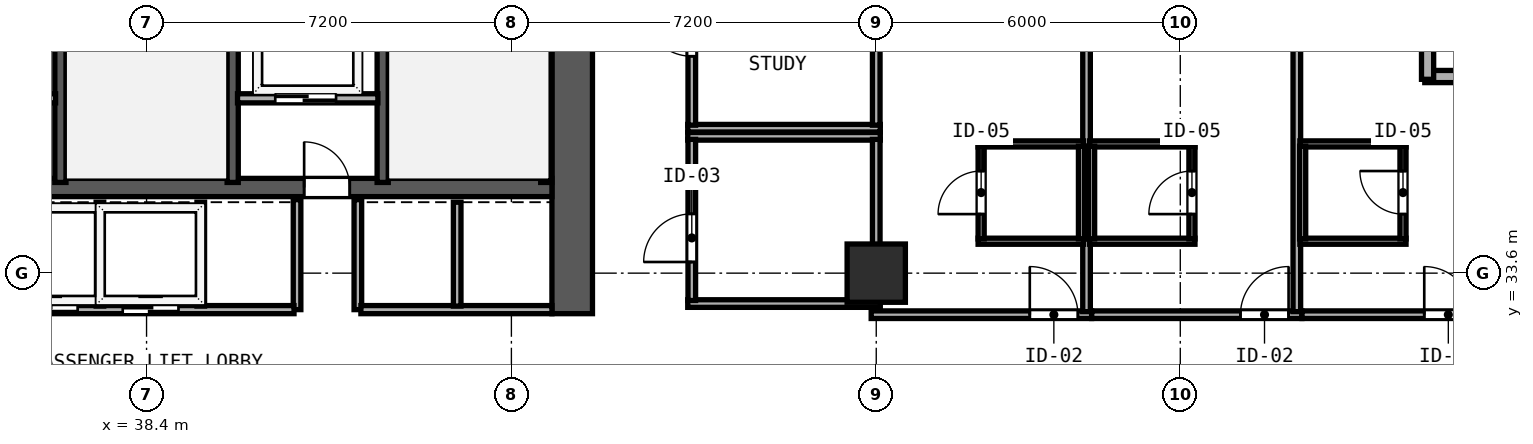
"""IFC4 building model, lengths in metres.
Left out: names, types, materials, properties, quantities, classifications, styles, units other than length and angle.
Written with IfcOpenShell. Run it as: python <this file> out.ifc"""

import sys

from ifc_helpers import new_model, si_unit, direction, frame, frame_2d, origin, origin_2d, place, context, subcontext, project, spatial, rectangle, hollow_rectangle, extrude, element, fill, save


model = new_model("IFC4")
c1 = context("Model", 3, precision=1e-05, world=origin(), true_north=direction((0.0, 1.0)))
c2 = subcontext(c1, "Body", "Model", "MODEL_VIEW")
j1 = project(units=[si_unit("LENGTHUNIT", "METRE"), si_unit("PLANEANGLEUNIT", "RADIAN")], contexts=[c1])
p1 = place(None, origin())
s1 = spatial("IfcSite", under=j1, at=p1, CompositionType="ELEMENT")
p2 = place(p1, origin())
s2 = spatial("IfcBuilding", under=s1, at=p2, CompositionType="ELEMENT")
p3 = place(p2, frame((0.0, 0.0, 85.6)))
s3 = spatial("IfcBuildingStorey", under=s2, at=p3, CompositionType="ELEMENT", Elevation=85.6)
p4 = place(p3, frame((46.8, 32.8, 0.0), z_axis=(0.0, 0.0, 1.0), x_axis=(0.0, 1.0, 0.0)))
e1 = element("IfcWall", 1, at=p4, inside=s3, PredefinedType="SHEAR", context=c2, shape_type="SweptSolid", body=[
    extrude(rectangle(XDim=10.0, YDim=0.8, at=frame_2d((5.0, 0.0))), origin(), (0.0, 0.0, 1.0), 3.54),
])
p5 = place(p3, frame((30.4, 35.29, 0.0), z_axis=(0.0, 0.0, 1.0), x_axis=(1.0, 0.0, 0.0)))
e2 = element("IfcWall", 2, at=p5, inside=s3, PredefinedType="SHEAR", context=c2, shape_type="SweptSolid", body=[
    extrude(rectangle(XDim=16.0, YDim=0.36, at=frame_2d((8.0, 0.0))), origin(), (0.0, 0.0, 1.0), 3.54),
])
p6 = place(p5, frame((4.95, 0.0, 0.0), z_axis=(0.0, 0.0, 1.0), x_axis=(-1.0, 0.0, 0.0)))
e3 = element("IfcOpeningElement", 3, at=p6, cuts=e2, PredefinedType="OPENING", context=c2, shape_type="SweptSolid", body=[
    extrude(rectangle(XDim=0.9, YDim=2.1, at=frame_2d((0.45, 1.05))), frame((0.0, 0.19, 0.0), z_axis=(0.0, -1.0, 0.0), x_axis=(1.0, 0.0, 0.0)), (0.0, 0.0, 1.0), 0.38),
])
p7 = place(p5, frame((12.01, 0.0, 0.0), z_axis=(0.0, 0.0, 1.0), x_axis=(-1.0, 0.0, 0.0)))
e4 = element("IfcOpeningElement", 4, at=p7, cuts=e2, PredefinedType="OPENING", context=c2, shape_type="SweptSolid", body=[
    extrude(rectangle(XDim=0.9, YDim=2.1, at=frame_2d((0.45, 1.05))), frame((0.0, 0.19, 0.0), z_axis=(0.0, -1.0, 0.0), x_axis=(1.0, 0.0, 0.0)), (0.0, 0.0, 1.0), 0.38),
])
for number, where, z_axis, x_axis in (
    (5, (36.7, 35.39, 0.0), (0.0, 0.0, 1.0), (0.0, 1.0, 0.0)),
    (6, (40.1, 35.39, 0.0), (0.0, 0.0, 1.0), (0.0, 1.0, 0.0)),
    (7, (43.06, 35.39, 0.0), (0.0, 0.0, 1.0), (0.0, 1.0, 0.0)),
    (8, (46.288, 35.39, 0.0), (0.0, 0.0, 1.0), (0.0, 1.0, 0.0)),
):
    element("IfcWall", number, at=place(p3, frame(where, z_axis=z_axis, x_axis=x_axis)), inside=s3, PredefinedType="SHEAR", context=c2, shape_type="SweptSolid", body=[
        extrude(rectangle(XDim=7.41, YDim=0.22, at=frame_2d((3.705, 0.0))), origin(), (0.0, 0.0, 1.0), 3.54),
    ])
p8 = place(p3, frame((52.8, 33.6, 0.0), z_axis=(0.0, 0.0, 1.0), x_axis=(1.0, 0.0, 0.0)))
e9 = element("IfcColumn", 9, at=p8, inside=s3, PredefinedType="COLUMN", context=c2, shape_type="SweptSolid", body=[
    extrude(hollow_rectangle(XDim=1.15, YDim=1.15, WallThickness=0.042, at=origin_2d()), origin(), (0.0, 0.0, 1.0), 3.8),
])
p9 = place(p3, frame((64.735, 37.48, 0.0), z_axis=(0.0, 0.0, 1.0), x_axis=(-1.0, 0.0, 0.0)))
e10 = element("IfcWall", 10, at=p9, inside=s3, PredefinedType="SOLIDWALL", context=c2, shape_type="SweptSolid", body=[
    extrude(rectangle(XDim=1.11, YDim=0.24, at=frame_2d((0.555, 0.0))), origin(), (0.0, 0.0, 1.0), 3.54),
])
p10 = place(p3, frame((63.68, 37.425, 0.0), z_axis=(0.0, 0.0, 1.0), x_axis=(0.0, 1.0, 0.0)))
e11 = element("IfcWall", 11, at=p10, inside=s3, PredefinedType="SOLIDWALL", context=c2, shape_type="SweptSolid", body=[
    extrude(rectangle(XDim=1.11, YDim=0.24, at=frame_2d((0.555, 0.0))), origin(), (0.0, 0.0, 1.0), 3.54),
])
p11 = place(p3, frame((33.835, 37.05, 0.0), z_axis=(0.0, 0.0, 1.0), x_axis=(1.0, 0.0, 0.0)))
e12 = element("IfcWall", 12, at=p11, inside=s3, PredefinedType="SOLIDWALL", context=c2, shape_type="SweptSolid", body=[
    extrude(rectangle(XDim=2.77, YDim=0.18, at=frame_2d((1.385, 0.0))), origin(), (0.0, 0.0, 1.0), 3.54),
])
p12 = place(p11, frame((1.945, 0.0, 0.0), z_axis=(0.0, 0.0, 1.0), x_axis=(-1.0, 0.0, 0.0)))
e13 = element("IfcOpeningElement", 13, at=p12, cuts=e12, PredefinedType="OPENING", context=c2, shape_type="SweptSolid", body=[
    extrude(rectangle(XDim=1.2, YDim=2.2, at=frame_2d((0.6, 1.1))), frame((0.0, 0.1, 0.0), z_axis=(0.0, -1.0, 0.0), x_axis=(1.0, 0.0, 0.0)), (0.0, 0.0, 1.0), 0.2),
])
p13 = place(p3, frame((40.195, 37.05, 0.0), z_axis=(0.0, 0.0, 1.0), x_axis=(1.0, 0.0, 0.0)))
e14 = element("IfcWall", 14, at=p13, inside=s3, PredefinedType="SOLIDWALL", context=c2, shape_type="SweptSolid", body=[
    extrude(rectangle(XDim=2.77, YDim=0.18, at=frame_2d((1.385, 0.0))), origin(), (0.0, 0.0, 1.0), 3.54),
])
p14 = place(p13, frame((1.945, 0.0, 0.0), z_axis=(0.0, 0.0, 1.0), x_axis=(-1.0, 0.0, 0.0)))
e15 = element("IfcOpeningElement", 15, at=p14, cuts=e14, PredefinedType="OPENING", context=c2, shape_type="SweptSolid", body=[
    extrude(rectangle(XDim=1.2, YDim=2.2, at=frame_2d((0.6, 1.1))), frame((0.0, 0.1, 0.0), z_axis=(0.0, -1.0, 0.0), x_axis=(1.0, 0.0, 0.0)), (0.0, 0.0, 1.0), 0.2),
])
for number, where, z_axis, x_axis in (
    (16, (41.37, 32.88, 0.0), (0.0, 0.0, 1.0), (0.0, 1.0, 0.0)),
    (17, (42.57, 32.88, 0.0), (0.0, 0.0, 1.0), (0.0, 1.0, 0.0)),
):
    element("IfcWall", number, at=place(p3, frame(where, z_axis=z_axis, x_axis=x_axis)), inside=s3, PredefinedType="SOLIDWALL", context=c2, shape_type="SweptSolid", body=[
        extrude(rectangle(XDim=2.17, YDim=0.15, at=frame_2d((1.085, 0.0))), origin(), (0.0, 0.0, 1.0), 3.54),
    ])
p15 = place(p3, frame((35.57, 32.88, 0.0), z_axis=(0.0, 0.0, 1.0), x_axis=(1.0, 0.0, 0.0)))
e18 = element("IfcWall", 18, at=p15, inside=s3, PredefinedType="SOLIDWALL", context=c2, shape_type="SweptSolid", body=[
    extrude(rectangle(XDim=5.74, YDim=0.16, at=frame_2d((2.87, 0.0))), origin(), (0.0, 0.0, 1.0), 3.54),
])
p16 = place(p15, frame((1.47, 0.0, 0.0), z_axis=(0.0, 0.0, 1.0), x_axis=(-1.0, 0.0, 0.0)))
e19 = element("IfcOpeningElement", 19, at=p16, cuts=e18, PredefinedType="OPENING", context=c2, shape_type="SweptSolid", body=[
    extrude(rectangle(XDim=1.1, YDim=2.2, at=frame_2d((0.55, 1.1))), frame((0.0, 0.09, 0.0), z_axis=(0.0, -1.0, 0.0), x_axis=(1.0, 0.0, 0.0)), (0.0, 0.0, 1.0), 0.18),
])
p17 = place(p15, frame((3.46, 0.0, 0.0), z_axis=(0.0, 0.0, 1.0), x_axis=(-1.0, 0.0, 0.0)))
e20 = element("IfcOpeningElement", 20, at=p17, cuts=e18, PredefinedType="OPENING", context=c2, shape_type="SweptSolid", body=[
    extrude(rectangle(XDim=1.1, YDim=2.2, at=frame_2d((0.55, 1.1))), frame((0.0, 0.09, 0.0), z_axis=(0.0, -1.0, 0.0), x_axis=(1.0, 0.0, 0.0)), (0.0, 0.0, 1.0), 0.18),
])
p18 = place(p3, frame((42.63, 32.88, 0.0), z_axis=(0.0, 0.0, 1.0), x_axis=(1.0, 0.0, 0.0)))
e21 = element("IfcWall", 21, at=p18, inside=s3, PredefinedType="SOLIDWALL", context=c2, shape_type="SweptSolid", body=[
    extrude(rectangle(XDim=3.77, YDim=0.16, at=frame_2d((1.885, 0.0))), origin(), (0.0, 0.0, 1.0), 3.54),
])
for number, where, z_axis, x_axis in (
    (22, (37.48, 32.95, 0.0), (0.0, 0.0, 1.0), (0.0, 1.0, 0.0)),
    (23, (39.47, 32.95, 0.0), (0.0, 0.0, 1.0), (0.0, 1.0, 0.0)),
    (24, (44.53, 32.95, 0.0), (0.0, 0.0, 1.0), (0.0, 1.0, 0.0)),
):
    element("IfcWall", number, at=place(p3, frame(where, z_axis=z_axis, x_axis=x_axis)), inside=s3, PredefinedType="SOLIDWALL", context=c2, shape_type="SweptSolid", body=[
        extrude(rectangle(XDim=2.05, YDim=0.15, at=frame_2d((1.025, 0.0))), origin(), (0.0, 0.0, 1.0), 3.54),
    ])
for number, where, z_axis, x_axis in (
    (25, (49.08, 36.3, 0.0), (0.0, 0.0, 1.0), (1.0, 0.0, 0.0)),
    (26, (49.08, 33.0, 0.0), (0.0, 0.0, 1.0), (1.0, 0.0, 0.0)),
):
    element("IfcWall", number, at=place(p3, frame(where, z_axis=z_axis, x_axis=x_axis)), inside=s3, PredefinedType="PARTITIONING", context=c2, shape_type="SweptSolid", body=[
        extrude(rectangle(XDim=3.8, YDim=0.15, at=frame_2d((1.9, 0.0))), origin(), (0.0, 0.0, 1.0), 3.54),
    ])
p19 = place(p3, frame((49.16, 33.06, 0.0), z_axis=(0.0, 0.0, 1.0), x_axis=(0.0, 1.0, 0.0)))
e27 = element("IfcWall", 27, at=p19, inside=s3, PredefinedType="PARTITIONING", context=c2, shape_type="SweptSolid", body=[
    extrude(rectangle(XDim=3.18, YDim=0.15, at=frame_2d((1.59, 0.0))), origin(), (0.0, 0.0, 1.0), 3.54),
])
p20 = place(p19, frame((0.76, 0.0, 0.0)))
e28 = element("IfcOpeningElement", 28, at=p20, cuts=e27, PredefinedType="OPENING", context=c2, shape_type="SweptSolid", body=[
    extrude(rectangle(XDim=0.95, YDim=2.12, at=frame_2d((0.475, 1.06))), frame((0.0, 0.085, 0.0), z_axis=(0.0, -1.0, 0.0), x_axis=(1.0, 0.0, 0.0)), (0.0, 0.0, 1.0), 0.17),
])
p21 = place(p3, frame((52.8, 33.06, 0.0), z_axis=(0.0, 0.0, 1.0), x_axis=(0.0, 1.0, 0.0)))
e29 = element("IfcWall", 29, at=p21, inside=s3, PredefinedType="PARTITIONING", context=c2, shape_type="SweptSolid", body=[
    extrude(rectangle(XDim=3.18, YDim=0.15, at=frame_2d((1.59, 0.0))), origin(), (0.0, 0.0, 1.0), 3.037),
])
p22 = place(p3, frame((49.08, 36.46, 0.0), z_axis=(0.0, 0.0, 1.0), x_axis=(1.0, 0.0, 0.0)))
e30 = element("IfcWall", 30, at=p22, inside=s3, PredefinedType="PARTITIONING", context=c2, shape_type="SweptSolid", body=[
    extrude(rectangle(XDim=3.8, YDim=0.15, at=frame_2d((1.9, 0.0))), origin(), (0.0, 0.0, 1.0), 3.54),
])
p23 = place(p3, frame((49.16, 36.52, 0.0), z_axis=(0.0, 0.0, 1.0), x_axis=(0.0, 1.0, 0.0)))
e31 = element("IfcWall", 31, at=p23, inside=s3, PredefinedType="PARTITIONING", context=c2, shape_type="SweptSolid", body=[
    extrude(rectangle(XDim=4.62, YDim=0.15, at=frame_2d((2.31, 0.0))), origin(), (0.0, 0.0, 1.0), 3.54),
])
p24 = place(p23, frame((1.36, 0.0, 0.0)))
e32 = element("IfcOpeningElement", 32, at=p24, cuts=e31, PredefinedType="OPENING", context=c2, shape_type="SweptSolid", body=[
    extrude(rectangle(XDim=0.95, YDim=2.12, at=frame_2d((0.475, 1.06))), frame((0.0, 0.085, 0.0), z_axis=(0.0, -1.0, 0.0), x_axis=(1.0, 0.0, 0.0)), (0.0, 0.0, 1.0), 0.17),
])
p25 = place(p3, frame((52.8, 36.52, 0.0), z_axis=(0.0, 0.0, 1.0), x_axis=(0.0, 1.0, 0.0)))
e33 = element("IfcWall", 33, at=p25, inside=s3, PredefinedType="PARTITIONING", context=c2, shape_type="SweptSolid", body=[
    extrude(rectangle(XDim=4.62, YDim=0.15, at=frame_2d((2.31, 0.0))), origin(), (0.0, 0.0, 1.0), 3.037),
])
p26 = place(p3, frame((52.7, 32.78, 0.0), z_axis=(0.0, 0.0, 1.0), x_axis=(1.0, 0.0, 0.0)))
e34 = element("IfcWall", 34, at=p26, inside=s3, PredefinedType="PARTITIONING", context=c2, shape_type="SweptSolid", body=[
    extrude(rectangle(XDim=4.35, YDim=0.15, at=frame_2d((2.175, 0.0))), origin(), (0.0, 0.0, 1.0), 3.54),
])
p27 = place(p26, frame((3.13, 0.0, 0.0)))
e35 = element("IfcOpeningElement", 35, at=p27, cuts=e34, PredefinedType="OPENING", context=c2, shape_type="SweptSolid", body=[
    extrude(rectangle(XDim=0.95, YDim=2.15, at=frame_2d((0.475, 1.075))), frame((0.0, 0.085, 0.0), z_axis=(0.0, -1.0, 0.0), x_axis=(1.0, 0.0, 0.0)), (0.0, 0.0, 1.0), 0.17),
])
p28 = place(p3, frame((56.95, 32.84, 0.0), z_axis=(0.0, 0.0, 1.0), x_axis=(0.0, 1.0, 0.0)))
e36 = element("IfcWall", 36, at=p28, inside=s3, PredefinedType="PARTITIONING", context=c2, shape_type="SweptSolid", body=[
    extrude(rectangle(XDim=9.939, YDim=0.15, at=frame_2d((4.97, 0.0))), origin(), (0.0, 0.0, 1.0), 3.54),
])
for number, where, z_axis, x_axis in (
    (37, (54.81, 36.15, 0.0), (0.0, 0.0, 1.0), (1.0, 0.0, 0.0)),
    (38, (54.81, 34.23, 0.0), (0.0, 0.0, 1.0), (1.0, 0.0, 0.0)),
):
    element("IfcWall", number, at=place(p3, frame(where, z_axis=z_axis, x_axis=x_axis)), inside=s3, PredefinedType="PARTITIONING", context=c2, shape_type="SweptSolid", body=[
        extrude(rectangle(XDim=2.08, YDim=0.12, at=frame_2d((1.04, 0.0))), origin(), (0.0, 0.0, 1.0), 3.54),
    ])
p29 = place(p3, frame((54.87, 34.275, 0.0), z_axis=(0.0, 0.0, 1.0), x_axis=(0.0, 1.0, 0.0)))
e39 = element("IfcWall", 39, at=p29, inside=s3, PredefinedType="PARTITIONING", context=c2, shape_type="SweptSolid", body=[
    extrude(rectangle(XDim=1.83, YDim=0.12, at=frame_2d((0.915, 0.0))), origin(), (0.0, 0.0, 1.0), 3.54),
])
p30 = place(p29, frame((1.34, 0.0, 0.0), z_axis=(0.0, 0.0, 1.0), x_axis=(-1.0, 0.0, 0.0)))
e40 = element("IfcOpeningElement", 40, at=p30, cuts=e39, PredefinedType="OPENING", context=c2, shape_type="SweptSolid", body=[
    extrude(rectangle(XDim=0.85, YDim=2.1, at=frame_2d((0.425, 1.05))), frame((0.0, 0.07, 0.0), z_axis=(0.0, -1.0, 0.0), x_axis=(1.0, 0.0, 0.0)), (0.0, 0.0, 1.0), 0.14),
])
p31 = place(p3, frame((56.85, 34.275, 0.0), z_axis=(0.0, 0.0, 1.0), x_axis=(0.0, 1.0, 0.0)))
e41 = element("IfcWall", 41, at=p31, inside=s3, PredefinedType="PARTITIONING", context=c2, shape_type="SweptSolid", body=[
    extrude(rectangle(XDim=1.83, YDim=0.12, at=frame_2d((0.915, 0.0))), origin(), (0.0, 0.0, 1.0), 3.54),
])
p32 = place(p3, frame((57.052, 32.78, 0.0), z_axis=(0.0, 0.0, 1.0), x_axis=(1.0, 0.0, 0.0)))
e42 = element("IfcWall", 42, at=p32, inside=s3, PredefinedType="PARTITIONING", context=c2, shape_type="SweptSolid", body=[
    extrude(rectangle(XDim=4.148, YDim=0.15, at=frame_2d((2.074, 0.0))), origin(), (0.0, 0.0, 1.0), 3.54),
])
p33 = place(p32, frame((2.935, 0.0, 0.0)))
e43 = element("IfcOpeningElement", 43, at=p33, cuts=e42, PredefinedType="OPENING", context=c2, shape_type="SweptSolid", body=[
    extrude(rectangle(XDim=0.95, YDim=2.15, at=frame_2d((0.475, 1.075))), frame((0.0, 0.085, 0.0), z_axis=(0.0, -1.0, 0.0), x_axis=(1.0, 0.0, 0.0)), (0.0, 0.0, 1.0), 0.17),
])
p34 = place(p3, frame((61.1, 32.84, 0.0), z_axis=(0.0, 0.0, 1.0), x_axis=(0.0, 1.0, 0.0)))
e44 = element("IfcWall", 44, at=p34, inside=s3, PredefinedType="PARTITIONING", context=c2, shape_type="SweptSolid", body=[
    extrude(rectangle(XDim=7.921, YDim=0.15, at=frame_2d((3.96, 0.0))), origin(), (0.0, 0.0, 1.0), 3.54),
])
for number, where, z_axis, x_axis in (
    (45, (57.01, 36.15, 0.0), (0.0, 0.0, 1.0), (1.0, 0.0, 0.0)),
    (46, (57.01, 34.23, 0.0), (0.0, 0.0, 1.0), (1.0, 0.0, 0.0)),
):
    element("IfcWall", number, at=place(p3, frame(where, z_axis=z_axis, x_axis=x_axis)), inside=s3, PredefinedType="PARTITIONING", context=c2, shape_type="SweptSolid", body=[
        extrude(rectangle(XDim=2.08, YDim=0.12, at=frame_2d((1.04, 0.0))), origin(), (0.0, 0.0, 1.0), 3.54),
    ])
p35 = place(p3, frame((57.05, 34.275, 0.0), z_axis=(0.0, 0.0, 1.0), x_axis=(0.0, 1.0, 0.0)))
e47 = element("IfcWall", 47, at=p35, inside=s3, PredefinedType="PARTITIONING", context=c2, shape_type="SweptSolid", body=[
    extrude(rectangle(XDim=1.83, YDim=0.12, at=frame_2d((0.915, 0.0))), origin(), (0.0, 0.0, 1.0), 3.54),
])
p36 = place(p3, frame((59.03, 34.275, 0.0), z_axis=(0.0, 0.0, 1.0), x_axis=(0.0, 1.0, 0.0)))
e48 = element("IfcWall", 48, at=p36, inside=s3, PredefinedType="PARTITIONING", context=c2, shape_type="SweptSolid", body=[
    extrude(rectangle(XDim=1.83, YDim=0.12, at=frame_2d((0.915, 0.0))), origin(), (0.0, 0.0, 1.0), 3.54),
])
p37 = place(p36, frame((0.49, 0.0, 0.0)))
e49 = element("IfcOpeningElement", 49, at=p37, cuts=e48, PredefinedType="OPENING", context=c2, shape_type="SweptSolid", body=[
    extrude(rectangle(XDim=0.85, YDim=2.1, at=frame_2d((0.425, 1.05))), frame((0.0, 0.07, 0.0), z_axis=(0.0, -1.0, 0.0), x_axis=(1.0, 0.0, 0.0)), (0.0, 0.0, 1.0), 0.14),
])
p38 = place(p3, frame((61.202, 32.78, 0.0), z_axis=(0.0, 0.0, 1.0), x_axis=(1.0, 0.0, 0.0)))
e50 = element("IfcWall", 50, at=p38, inside=s3, PredefinedType="PARTITIONING", context=c2, shape_type="SweptSolid", body=[
    extrude(rectangle(XDim=3.898, YDim=0.15, at=frame_2d((1.949, 0.0))), origin(), (0.0, 0.0, 1.0), 3.54),
])
p39 = place(p38, frame((2.413, 0.0, 0.0)))
e51 = element("IfcOpeningElement", 51, at=p39, cuts=e50, PredefinedType="OPENING", context=c2, shape_type="SweptSolid", body=[
    extrude(rectangle(XDim=0.95, YDim=2.15, at=frame_2d((0.475, 1.075))), frame((0.0, 0.085, 0.0), z_axis=(0.0, -1.0, 0.0), x_axis=(1.0, 0.0, 0.0)), (0.0, 0.0, 1.0), 0.17),
])
for number, where, z_axis, x_axis in (
    (52, (61.16, 36.15, 0.0), (0.0, 0.0, 1.0), (1.0, 0.0, 0.0)),
    (53, (61.16, 34.23, 0.0), (0.0, 0.0, 1.0), (1.0, 0.0, 0.0)),
):
    element("IfcWall", number, at=place(p3, frame(where, z_axis=z_axis, x_axis=x_axis)), inside=s3, PredefinedType="PARTITIONING", context=c2, shape_type="SweptSolid", body=[
        extrude(rectangle(XDim=2.095, YDim=0.12, at=frame_2d((1.047, 0.0))), origin(), (0.0, 0.0, 1.0), 3.54),
    ])
p40 = place(p3, frame((61.215, 34.275, 0.0), z_axis=(0.0, 0.0, 1.0), x_axis=(0.0, 1.0, 0.0)))
e54 = element("IfcWall", 54, at=p40, inside=s3, PredefinedType="PARTITIONING", context=c2, shape_type="SweptSolid", body=[
    extrude(rectangle(XDim=1.83, YDim=0.12, at=frame_2d((0.915, 0.0))), origin(), (0.0, 0.0, 1.0), 3.54),
])
p41 = place(p3, frame((63.195, 34.275, 0.0), z_axis=(0.0, 0.0, 1.0), x_axis=(0.0, 1.0, 0.0)))
e55 = element("IfcWall", 55, at=p41, inside=s3, PredefinedType="PARTITIONING", context=c2, shape_type="SweptSolid", body=[
    extrude(rectangle(XDim=1.83, YDim=0.12, at=frame_2d((0.915, 0.0))), origin(), (0.0, 0.0, 1.0), 3.54),
])
p42 = place(p41, frame((0.49, 0.0, 0.0)))
e56 = element("IfcOpeningElement", 56, at=p42, cuts=e55, PredefinedType="OPENING", context=c2, shape_type="SweptSolid", body=[
    extrude(rectangle(XDim=0.85, YDim=2.1, at=frame_2d((0.425, 1.05))), frame((0.0, 0.07, 0.0), z_axis=(0.0, -1.0, 0.0), x_axis=(1.0, 0.0, 0.0)), (0.0, 0.0, 1.0), 0.14),
])
p43 = place(p14, origin())
e57 = element("IfcDoor", 57, at=p43, inside=s3, OperationType="SLIDING_TO_RIGHT", PredefinedType="DOOR", context=c2, shape_type="SweptSolid", body=[
    extrude(rectangle(XDim=1.2, YDim=2.2, at=frame_2d((0.6, 1.1))), frame((0.0, 0.025, 0.0), z_axis=(0.0, -1.0, 0.0), x_axis=(1.0, 0.0, 0.0)), (0.0, 0.0, 1.0), 0.05),
])
fill(e15, e57)
p44 = place(p7, origin())
e58 = element("IfcDoor", 58, at=p44, inside=s3, OperationType="SINGLE_SWING_RIGHT", PredefinedType="DOOR", context=c2, shape_type="SweptSolid", body=[
    extrude(rectangle(XDim=0.9, YDim=2.1, at=frame_2d((0.45, 1.05))), frame((0.0, 0.025, 0.0), z_axis=(0.0, -1.0, 0.0), x_axis=(1.0, 0.0, 0.0)), (0.0, 0.0, 1.0), 0.05),
])
fill(e4, e58)
p45 = place(p16, origin())
e59 = element("IfcDoor", 59, at=p45, inside=s3, OperationType="SLIDING_TO_LEFT", PredefinedType="DOOR", context=c2, shape_type="SweptSolid", body=[
    extrude(rectangle(XDim=1.1, YDim=2.2, at=frame_2d((0.55, 1.1))), frame((0.0, 0.025, 0.0), z_axis=(0.0, -1.0, 0.0), x_axis=(1.0, 0.0, 0.0)), (0.0, 0.0, 1.0), 0.05),
])
fill(e19, e59)
p46 = place(p17, origin())
e60 = element("IfcDoor", 60, at=p46, inside=s3, OperationType="SLIDING_TO_LEFT", PredefinedType="DOOR", context=c2, shape_type="SweptSolid", body=[
    extrude(rectangle(XDim=1.1, YDim=2.2, at=frame_2d((0.55, 1.1))), frame((0.0, 0.025, 0.0), z_axis=(0.0, -1.0, 0.0), x_axis=(1.0, 0.0, 0.0)), (0.0, 0.0, 1.0), 0.05),
])
fill(e20, e60)
p47 = place(p20, origin())
e61 = element("IfcDoor", 61, at=p47, inside=s3, OperationType="SINGLE_SWING_LEFT", PredefinedType="DOOR", context=c2, shape_type="SweptSolid", body=[
    extrude(rectangle(XDim=0.95, YDim=2.12, at=frame_2d((0.475, 1.06))), frame((0.0, 0.025, 0.0), z_axis=(0.0, -1.0, 0.0), x_axis=(1.0, 0.0, 0.0)), (0.0, 0.0, 1.0), 0.05),
])
fill(e28, e61)
p48 = place(p24, origin())
e62 = element("IfcDoor", 62, at=p48, inside=s3, OperationType="SINGLE_SWING_RIGHT", PredefinedType="DOOR", context=c2, shape_type="SweptSolid", body=[
    extrude(rectangle(XDim=0.95, YDim=2.12, at=frame_2d((0.475, 1.06))), frame((0.0, 0.025, 0.0), z_axis=(0.0, -1.0, 0.0), x_axis=(1.0, 0.0, 0.0)), (0.0, 0.0, 1.0), 0.05),
])
fill(e32, e62)
p49 = place(p27, origin())
e63 = element("IfcDoor", 63, at=p49, inside=s3, OperationType="SINGLE_SWING_LEFT", PredefinedType="DOOR", context=c2, shape_type="SweptSolid", body=[
    extrude(rectangle(XDim=0.95, YDim=2.15, at=frame_2d((0.475, 1.075))), frame((0.0, 0.025, 0.0), z_axis=(0.0, -1.0, 0.0), x_axis=(1.0, 0.0, 0.0)), (0.0, 0.0, 1.0), 0.05),
])
fill(e35, e63)
p50 = place(p30, origin())
e64 = element("IfcDoor", 64, at=p50, inside=s3, OperationType="SINGLE_SWING_RIGHT", PredefinedType="DOOR", context=c2, shape_type="SweptSolid", body=[
    extrude(rectangle(XDim=0.85, YDim=2.1, at=frame_2d((0.425, 1.05))), frame((0.0, 0.025, 0.0), z_axis=(0.0, -1.0, 0.0), x_axis=(1.0, 0.0, 0.0)), (0.0, 0.0, 1.0), 0.05),
])
fill(e40, e64)
p51 = place(p33, origin())
e65 = element("IfcDoor", 65, at=p51, inside=s3, OperationType="SINGLE_SWING_RIGHT", PredefinedType="DOOR", context=c2, shape_type="SweptSolid", body=[
    extrude(rectangle(XDim=0.95, YDim=2.15, at=frame_2d((0.475, 1.075))), frame((0.0, 0.025, 0.0), z_axis=(0.0, -1.0, 0.0), x_axis=(1.0, 0.0, 0.0)), (0.0, 0.0, 1.0), 0.05),
])
fill(e43, e65)
p52 = place(p37, origin())
e66 = element("IfcDoor", 66, at=p52, inside=s3, OperationType="SINGLE_SWING_LEFT", PredefinedType="DOOR", context=c2, shape_type="SweptSolid", body=[
    extrude(rectangle(XDim=0.85, YDim=2.1, at=frame_2d((0.425, 1.05))), frame((0.0, 0.025, 0.0), z_axis=(0.0, -1.0, 0.0), x_axis=(1.0, 0.0, 0.0)), (0.0, 0.0, 1.0), 0.05),
])
fill(e49, e66)
p53 = place(p39, origin())
e67 = element("IfcDoor", 67, at=p53, inside=s3, OperationType="SINGLE_SWING_LEFT", PredefinedType="DOOR", context=c2, shape_type="SweptSolid", body=[
    extrude(rectangle(XDim=0.95, YDim=2.15, at=frame_2d((0.475, 1.075))), frame((0.0, 0.025, 0.0), z_axis=(0.0, -1.0, 0.0), x_axis=(1.0, 0.0, 0.0)), (0.0, 0.0, 1.0), 0.05),
])
fill(e51, e67)
p54 = place(p42, origin())
e68 = element("IfcDoor", 68, at=p54, inside=s3, OperationType="SINGLE_SWING_RIGHT", PredefinedType="DOOR", context=c2, shape_type="SweptSolid", body=[
    extrude(rectangle(XDim=0.85, YDim=2.1, at=frame_2d((0.425, 1.05))), frame((0.0, 0.025, 0.0), z_axis=(0.0, -1.0, 0.0), x_axis=(1.0, 0.0, 0.0)), (0.0, 0.0, 1.0), 0.05),
])
fill(e56, e68)
save(model, sys.argv[1])
